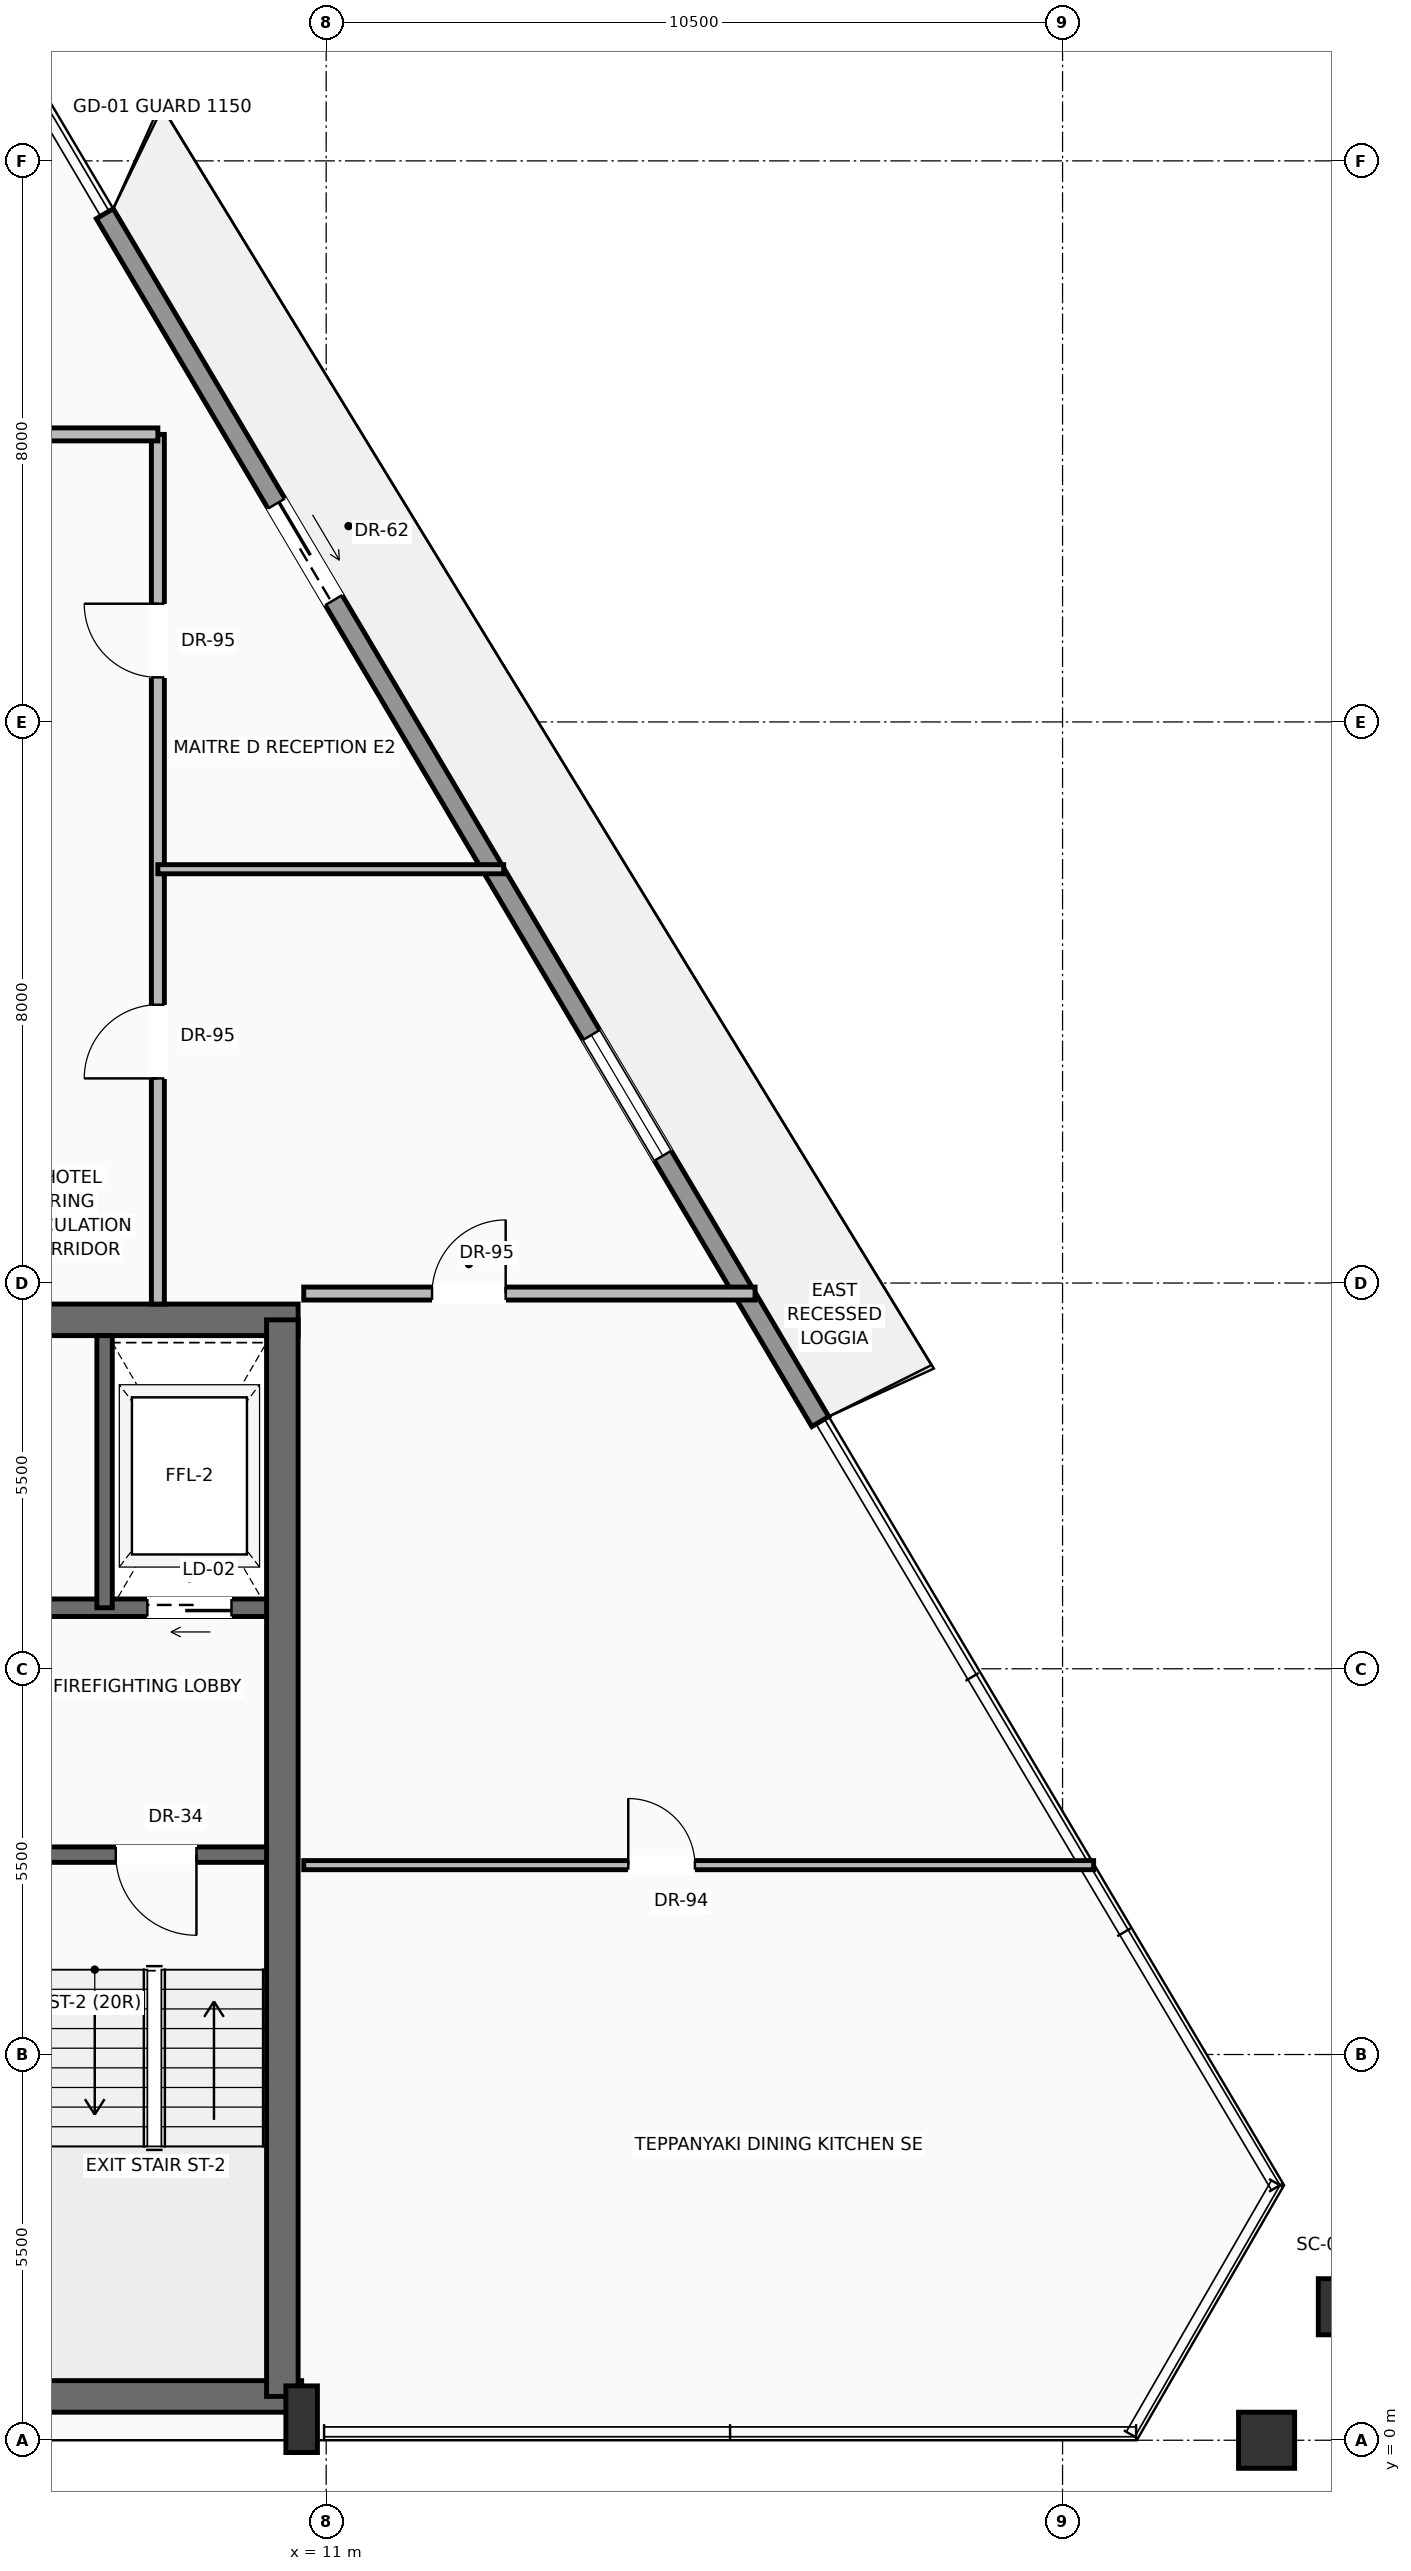
"""IFC4 building model, lengths in metres.
Left out: names, types, materials, properties, quantities, classifications, styles, units other than length and angle.
Written with IfcOpenShell. Run it as: python <this file> out.ifc"""

import sys

from ifc_helpers import new_model, si_unit, direction, frame, frame_2d, origin, origin_2d, place, context, subcontext, project, spatial, rectangle, hollow_rectangle, extrude, source, transform, mapped, element, fill, save


model = new_model("IFC4")
c1 = context("Model", 3, precision=1e-05, world=origin(), true_north=direction((0.0, 1.0)))
c2 = subcontext(c1, "Body", "Model", "MODEL_VIEW")
j1 = project(units=[si_unit("LENGTHUNIT", "METRE"), si_unit("PLANEANGLEUNIT", "RADIAN")], contexts=[c1])
p1 = place(None, origin())
s1 = spatial("IfcSite", under=j1, at=p1, CompositionType="ELEMENT")
p2 = place(p1, origin())
s2 = spatial("IfcBuilding", under=s1, at=p2, CompositionType="ELEMENT")
p3 = place(p2, frame((0.0, 0.0, 276.45)))
s3 = spatial("IfcBuildingStorey", under=s2, at=p3, CompositionType="ELEMENT", Elevation=276.45)
p4 = place(p3, frame((-10.65, 0.625, 0.0), z_axis=(0.0, 0.0, 1.0), x_axis=(1.0, 0.0, 0.0)))
e1 = element("IfcWall", 1, at=p4, inside=s3, PredefinedType="SHEAR", context=c2, shape_type="SweptSolid", body=[
    extrude(rectangle(XDim=21.3, YDim=0.45, at=frame_2d((10.65, 0.0))), origin(), (0.0, 0.0, 1.0), 3.24),
])
p5 = place(p3, frame((-10.6, 15.975, 0.0), z_axis=(0.0, 0.0, 1.0), x_axis=(1.0, 0.0, 0.0)))
e2 = element("IfcWall", 2, at=p5, inside=s3, PredefinedType="SHEAR", context=c2, shape_type="SweptSolid", body=[
    extrude(rectangle(XDim=21.2, YDim=0.45, at=frame_2d((10.6, 0.0))), origin(), (0.0, 0.0, 1.0), 3.24),
])
p6 = place(p5, frame((3.17, 0.0, 0.0)))
e3 = element("IfcOpeningElement", 3, at=p6, cuts=e2, PredefinedType="OPENING", context=c2, shape_type="SweptSolid", body=[
    extrude(rectangle(XDim=1.3, YDim=2.3, at=frame_2d((0.65, 1.15))), frame((0.0, 0.235, 0.0), z_axis=(0.0, -1.0, 0.0), x_axis=(1.0, 0.0, 0.0)), (0.0, 0.0, 1.0), 0.47),
])
p7 = place(p5, frame((9.6, 0.0, 0.0)))
e4 = element("IfcOpeningElement", 4, at=p7, cuts=e2, PredefinedType="OPENING", context=c2, shape_type="SweptSolid", body=[
    extrude(rectangle(XDim=2.0, YDim=2.4, at=frame_2d((1.0, 1.2))), frame((0.0, 0.235, 0.0), z_axis=(0.0, -1.0, 0.0), x_axis=(1.0, 0.0, 0.0)), (0.0, 0.0, 1.0), 0.47),
])
p8 = place(p3, frame((10.375, 0.625, 0.0), z_axis=(0.0, 0.0, 1.0), x_axis=(0.0, 1.0, 0.0)))
e5 = element("IfcWall", 5, at=p8, inside=s3, PredefinedType="SHEAR", context=c2, shape_type="SweptSolid", body=[
    extrude(rectangle(XDim=15.35, YDim=0.45, at=frame_2d((7.675, 0.0))), origin(), (0.0, 0.0, 1.0), 3.24),
])
m1 = source(origin(), c2, "Body", "SweptSolid", [
    extrude(rectangle(XDim=0.45, YDim=0.95, at=origin_2d()), origin(), (0.0, 0.0, 1.0), 3.45),
])
p9 = place(p3, frame((10.65, 0.3, 0.0), z_axis=(0.0, 0.0, 1.0), x_axis=(1.0, 0.0, 0.0)))
e6 = element("IfcColumn", 6, at=p9, inside=s3, PredefinedType="PILASTER", context=c2, shape_type="MappedRepresentation", body=[
    mapped(m1, transform((0.0, 0.0, 0.0), scale=1.0)),
])
m2 = source(origin(), c2, "Body", "SweptSolid", [
    extrude(hollow_rectangle(XDim=0.8, YDim=0.8, WallThickness=0.04, at=origin_2d()), origin(), (0.0, 0.0, 1.0), 3.441),
])
p10 = place(p3, frame((24.409, 0.0, 0.004), z_axis=(-0.002695981689, 0.0, 0.999996365835), x_axis=(0.0, -1.0, 0.0)))
e7 = element("IfcColumn", 7, at=p10, inside=s3, PredefinedType="COLUMN", context=c2, shape_type="MappedRepresentation", body=[
    mapped(m2, transform((0.0, 0.0, 0.0), scale=1.0)),
])
m3 = source(origin(), c2, "Body", "SweptSolid", [
    extrude(hollow_rectangle(XDim=0.8, YDim=0.8, WallThickness=0.04, at=origin_2d()), origin(), (0.0, 0.0, 1.0), 3.442),
])
p11 = place(p3, frame((25.546, 1.904, 0.004), z_axis=(-0.012484203697, -0.015605254621, 0.999800290401), x_axis=(0.780868809443, -0.624695047554, 0.0)))
e8 = element("IfcColumn", 8, at=p11, inside=s3, PredefinedType="COLUMN", context=c2, shape_type="MappedRepresentation", body=[
    mapped(m3, transform((0.0, 0.0, 0.0), scale=1.0)),
])
p12 = place(p3, frame((7.843, 31.747, 0.0), z_axis=(0.0, 0.0, 1.0), x_axis=(0.50967367276, -0.860367797686, 0.0)))
e9 = element("IfcWall", 9, at=p12, inside=s3, PredefinedType="SOLIDWALL", context=c2, shape_type="SweptSolid", body=[
    extrude(rectangle(XDim=20.018, YDim=0.28, at=frame_2d((10.009, 0.0))), origin(), (0.0, 0.0, 1.0), 2.82),
])
p13 = place(p12, frame((4.804, 0.0, 0.0)))
e10 = element("IfcOpeningElement", 10, at=p13, cuts=e9, PredefinedType="OPENING", context=c2, shape_type="SweptSolid", body=[
    extrude(rectangle(XDim=1.6, YDim=2.35, at=frame_2d((0.8, 1.175))), frame((0.0, 0.15, 0.0), z_axis=(0.0, -1.0, 0.0), x_axis=(1.0, 0.0, 0.0)), (0.0, 0.0, 1.0), 0.3),
])
p14 = place(p12, frame((13.612, 0.0, 0.9)))
e11 = element("IfcOpeningElement", 11, at=p14, cuts=e9, PredefinedType="OPENING", context=c2, shape_type="SweptSolid", body=[
    extrude(rectangle(XDim=2.0, YDim=1.75, at=frame_2d((1.0, 0.875))), frame((0.0, 0.15, 0.0), z_axis=(0.0, -1.0, 0.0), x_axis=(1.0, 0.0, 0.0)), (0.0, 0.0, 1.0), 0.3),
])
p15 = place(p3, frame((10.15, 8.35, 0.0), z_axis=(0.0, 0.0, 1.0), x_axis=(-1.0, 0.0, 0.0)))
e12 = element("IfcWall", 12, at=p15, inside=s3, PredefinedType="SOLIDWALL", context=c2, shape_type="SweptSolid", body=[
    extrude(rectangle(XDim=4.65, YDim=0.22, at=frame_2d((2.325, 0.0))), origin(), (0.0, 0.0, 1.0), 3.24),
])
p16 = place(p15, frame((1.0, 0.0, 0.0)))
e13 = element("IfcOpeningElement", 13, at=p16, cuts=e12, PredefinedType="OPENING", context=c2, shape_type="SweptSolid", body=[
    extrude(rectangle(XDim=1.15, YDim=2.2, at=frame_2d((0.575, 1.1))), frame((0.0, 0.12, 0.0), z_axis=(0.0, -1.0, 0.0), x_axis=(1.0, 0.0, 0.0)), (0.0, 0.0, 1.0), 0.24),
])
p17 = place(p3, frame((10.15, 11.87, 0.0), z_axis=(0.0, 0.0, 1.0), x_axis=(-1.0, 0.0, 0.0)))
e14 = element("IfcWall", 14, at=p17, inside=s3, PredefinedType="SOLIDWALL", context=c2, shape_type="SweptSolid", body=[
    extrude(rectangle(XDim=4.65, YDim=0.25, at=frame_2d((2.325, 0.0))), origin(), (0.0, 0.0, 1.0), 3.24),
])
p18 = place(p17, frame((0.5, 0.0, 0.0)))
e15 = element("IfcOpeningElement", 15, at=p18, cuts=e14, PredefinedType="OPENING", context=c2, shape_type="SweptSolid", body=[
    extrude(rectangle(XDim=1.2, YDim=2.25, at=frame_2d((0.6, 1.125))), frame((0.0, 0.135, 0.0), z_axis=(0.0, -1.0, 0.0), x_axis=(1.0, 0.0, 0.0)), (0.0, 0.0, 1.0), 0.27),
])
p19 = place(p3, frame((7.84, 11.87, 0.0), z_axis=(0.0, 0.0, 1.0), x_axis=(0.0, 1.0, 0.0)))
e16 = element("IfcWall", 16, at=p19, inside=s3, PredefinedType="SOLIDWALL", context=c2, shape_type="SweptSolid", body=[
    extrude(rectangle(XDim=3.88, YDim=0.22, at=frame_2d((1.94, 0.0))), origin(), (0.0, 0.0, 1.0), 3.24),
])
p20 = place(p3, frame((8.6, 16.2, 0.0), z_axis=(0.0, 0.0, 1.0), x_axis=(0.0, 1.0, 0.0)))
e17 = element("IfcWall", 17, at=p20, inside=s3, PredefinedType="PARTITIONING", context=c2, shape_type="SweptSolid", body=[
    extrude(rectangle(XDim=12.4, YDim=0.185, at=frame_2d((6.2, 0.0))), origin(), (0.0, 0.0, 1.0), 3.232),
])
p21 = place(p20, frame((3.218, 0.0, 0.0)))
e18 = element("IfcOpeningElement", 18, at=p21, cuts=e17, PredefinedType="OPENING", context=c2, shape_type="SweptSolid", body=[
    extrude(rectangle(XDim=1.05, YDim=2.25, at=frame_2d((0.525, 1.125))), frame((0.0, 0.103, 0.0), z_axis=(0.0, -1.0, 0.0), x_axis=(1.0, 0.0, 0.0)), (0.0, 0.0, 1.0), 0.205),
])
p22 = place(p20, frame((8.936, 0.0, 0.0)))
e19 = element("IfcOpeningElement", 19, at=p22, cuts=e17, PredefinedType="OPENING", context=c2, shape_type="SweptSolid", body=[
    extrude(rectangle(XDim=1.05, YDim=2.25, at=frame_2d((0.525, 1.125))), frame((0.0, 0.103, 0.0), z_axis=(0.0, -1.0, 0.0), x_axis=(1.0, 0.0, 0.0)), (0.0, 0.0, 1.0), 0.205),
])
p23 = place(p3, frame((-8.05, 28.6, 0.0), z_axis=(0.0, 0.0, 1.0), x_axis=(1.0, 0.0, 0.0)))
e20 = element("IfcWall", 20, at=p23, inside=s3, PredefinedType="PARTITIONING", context=c2, shape_type="SweptSolid", body=[
    extrude(rectangle(XDim=16.65, YDim=0.185, at=frame_2d((8.325, 0.0))), origin(), (0.0, 0.0, 1.0), 3.232),
])
p24 = place(p23, frame((3.248, 0.0, 0.0)))
e21 = element("IfcOpeningElement", 21, at=p24, cuts=e20, PredefinedType="OPENING", context=c2, shape_type="SweptSolid", body=[
    extrude(rectangle(XDim=1.05, YDim=2.25, at=frame_2d((0.525, 1.125))), frame((0.0, 0.103, 0.0), z_axis=(0.0, -1.0, 0.0), x_axis=(1.0, 0.0, 0.0)), (0.0, 0.0, 1.0), 0.205),
])
p25 = place(p23, frame((7.8, 0.0, 0.0)))
e22 = element("IfcOpeningElement", 22, at=p25, cuts=e20, PredefinedType="OPENING", context=c2, shape_type="SweptSolid", body=[
    extrude(rectangle(XDim=1.05, YDim=2.25, at=frame_2d((0.525, 1.125))), frame((0.0, 0.103, 0.0), z_axis=(0.0, -1.0, 0.0), x_axis=(1.0, 0.0, 0.0)), (0.0, 0.0, 1.0), 0.205),
])
p26 = place(p23, frame((11.802, 0.0, 0.0)))
e23 = element("IfcOpeningElement", 23, at=p26, cuts=e20, PredefinedType="OPENING", context=c2, shape_type="SweptSolid", body=[
    extrude(rectangle(XDim=1.05, YDim=2.25, at=frame_2d((0.525, 1.125))), frame((0.0, 0.103, 0.0), z_axis=(0.0, -1.0, 0.0), x_axis=(1.0, 0.0, 0.0)), (0.0, 0.0, 1.0), 0.205),
])
p27 = place(p23, frame((0.802, 0.0, 0.0)))
e24 = element("IfcOpeningElement", 24, at=p27, cuts=e20, PredefinedType="OPENING", context=c2, shape_type="SweptSolid", body=[
    extrude(rectangle(XDim=1.05, YDim=2.25, at=frame_2d((0.525, 1.125))), frame((0.0, 0.103, 0.0), z_axis=(0.0, -1.0, 0.0), x_axis=(1.0, 0.0, 0.0)), (0.0, 0.0, 1.0), 0.205),
])
p28 = place(p3, frame((10.68, 16.35, 0.0), z_axis=(0.0, 0.0, 1.0), x_axis=(1.0, 0.0, 0.0)))
e25 = element("IfcWall", 25, at=p28, inside=s3, PredefinedType="PARTITIONING", context=c2, shape_type="SweptSolid", body=[
    extrude(rectangle(XDim=6.435, YDim=0.185, at=frame_2d((3.218, 0.0))), origin(), (0.0, 0.0, 1.0), 3.232),
])
p29 = place(p28, frame((1.829, 0.0, 0.0)))
e26 = element("IfcOpeningElement", 26, at=p29, cuts=e25, PredefinedType="OPENING", context=c2, shape_type="SweptSolid", body=[
    extrude(rectangle(XDim=1.05, YDim=2.25, at=frame_2d((0.525, 1.125))), frame((0.0, 0.103, 0.0), z_axis=(0.0, -1.0, 0.0), x_axis=(1.0, 0.0, 0.0)), (0.0, 0.0, 1.0), 0.205),
])
p30 = place(p3, frame((10.68, 8.2, 0.0), z_axis=(0.0, 0.0, 1.0), x_axis=(1.0, 0.0, 0.0)))
e27 = element("IfcWall", 27, at=p30, inside=s3, PredefinedType="PARTITIONING", context=c2, shape_type="SweptSolid", body=[
    extrude(rectangle(XDim=11.263, YDim=0.13, at=frame_2d((5.632, 0.0))), origin(), (0.0, 0.0, 1.0), 3.232),
])
p31 = place(p30, frame((4.627, 0.0, 0.0)))
e28 = element("IfcOpeningElement", 28, at=p31, cuts=e27, PredefinedType="OPENING", context=c2, shape_type="SweptSolid", body=[
    extrude(rectangle(XDim=0.95, YDim=2.2, at=frame_2d((0.475, 1.1))), frame((0.0, 0.075, 0.0), z_axis=(0.0, -1.0, 0.0), x_axis=(1.0, 0.0, 0.0)), (0.0, 0.0, 1.0), 0.15),
])
p32 = place(p3, frame((8.6, 22.4, 0.0), z_axis=(0.0, 0.0, 1.0), x_axis=(1.0, 0.0, 0.0)))
e29 = element("IfcWall", 29, at=p32, inside=s3, PredefinedType="PARTITIONING", context=c2, shape_type="SweptSolid", body=[
    extrude(rectangle(XDim=4.931, YDim=0.13, at=frame_2d((2.466, 0.0))), origin(), (0.0, 0.0, 1.0), 3.232),
])
m4 = source(origin(), c2, "Body", "SweptSolid", [
    extrude(rectangle(XDim=1.6, YDim=2.35, at=frame_2d((0.8, 1.175))), frame((0.0, 0.025, 0.0), z_axis=(0.0, -1.0, 0.0), x_axis=(1.0, 0.0, 0.0)), (0.0, 0.0, 1.0), 0.05),
])
p33 = place(p13, origin())
e30 = element("IfcDoor", 30, at=p33, inside=s3, OperationType="SLIDING_TO_RIGHT", PredefinedType="DOOR", context=c2, shape_type="MappedRepresentation", body=[
    mapped(m4, transform((0.0, 0.0, 0.0), scale=1.0)),
])
fill(e10, e30)
m5 = source(origin(), c2, "Body", "SweptSolid", [
    extrude(rectangle(XDim=2.0, YDim=1.75, at=frame_2d((1.0, 0.875))), frame((0.0, 0.03, 0.0), z_axis=(0.0, -1.0, 0.0), x_axis=(1.0, 0.0, 0.0)), (0.0, 0.0, 1.0), 0.06),
])
p34 = place(p14, origin())
e31 = element("IfcWindow", 31, at=p34, inside=s3, PartitioningType="SINGLE_PANEL", PredefinedType="WINDOW", context=c2, shape_type="MappedRepresentation", body=[
    mapped(m5, transform((0.0, 0.0, 0.0), scale=1.0)),
])
fill(e11, e31)
m6 = source(origin(), c2, "Body", "SweptSolid", [
    extrude(rectangle(XDim=1.15, YDim=2.2, at=frame_2d((0.575, 1.1))), frame((0.0, 0.025, 0.0), z_axis=(0.0, -1.0, 0.0), x_axis=(1.0, 0.0, 0.0)), (0.0, 0.0, 1.0), 0.05),
])
p35 = place(p16, origin())
e32 = element("IfcDoor", 32, at=p35, inside=s3, OperationType="SINGLE_SWING_LEFT", PredefinedType="DOOR", context=c2, shape_type="MappedRepresentation", body=[
    mapped(m6, transform((0.0, 0.0, 0.0), scale=1.0)),
])
fill(e13, e32)
m7 = source(origin(), c2, "Body", "SweptSolid", [
    extrude(rectangle(XDim=1.2, YDim=2.25, at=frame_2d((0.6, 1.125))), frame((0.0, 0.025, 0.0), z_axis=(0.0, -1.0, 0.0), x_axis=(1.0, 0.0, 0.0)), (0.0, 0.0, 1.0), 0.05),
])
p36 = place(p18, origin())
e33 = element("IfcDoor", 33, at=p36, inside=s3, OperationType="SLIDING_TO_RIGHT", PredefinedType="DOOR", context=c2, shape_type="MappedRepresentation", body=[
    mapped(m7, transform((0.0, 0.0, 0.0), scale=1.0)),
])
fill(e15, e33)
m8 = source(origin(), c2, "Body", "SweptSolid", [
    extrude(rectangle(XDim=1.05, YDim=2.25, at=frame_2d((0.525, 1.125))), frame((0.0, 0.025, 0.0), z_axis=(0.0, -1.0, 0.0), x_axis=(1.0, 0.0, 0.0)), (0.0, 0.0, 1.0), 0.05),
])
p37 = place(p29, origin())
e34 = element("IfcDoor", 34, at=p37, inside=s3, OperationType="SINGLE_SWING_RIGHT", PredefinedType="DOOR", context=c2, shape_type="MappedRepresentation", body=[
    mapped(m8, transform((0.0, 0.0, 0.0), scale=1.0)),
])
fill(e26, e34)
m9 = source(origin(), c2, "Body", "SweptSolid", [
    extrude(rectangle(XDim=0.95, YDim=2.2, at=frame_2d((0.475, 1.1))), frame((0.0, 0.025, 0.0), z_axis=(0.0, -1.0, 0.0), x_axis=(1.0, 0.0, 0.0)), (0.0, 0.0, 1.0), 0.05),
])
p38 = place(p31, origin())
e35 = element("IfcDoor", 35, at=p38, inside=s3, OperationType="SINGLE_SWING_LEFT", PredefinedType="DOOR", context=c2, shape_type="MappedRepresentation", body=[
    mapped(m9, transform((0.0, 0.0, 0.0), scale=1.0)),
])
fill(e28, e35)
p39 = place(p21, origin())
e36 = element("IfcDoor", 36, at=p39, inside=s3, OperationType="SINGLE_SWING_LEFT", PredefinedType="DOOR", context=c2, shape_type="MappedRepresentation", body=[
    mapped(m8, transform((0.0, 0.0, 0.0), scale=1.0)),
])
fill(e18, e36)
p40 = place(p22, origin())
e37 = element("IfcDoor", 37, at=p40, inside=s3, OperationType="SINGLE_SWING_RIGHT", PredefinedType="DOOR", context=c2, shape_type="MappedRepresentation", body=[
    mapped(m8, transform((0.0, 0.0, 0.0), scale=1.0)),
])
fill(e19, e37)
save(model, sys.argv[1])
